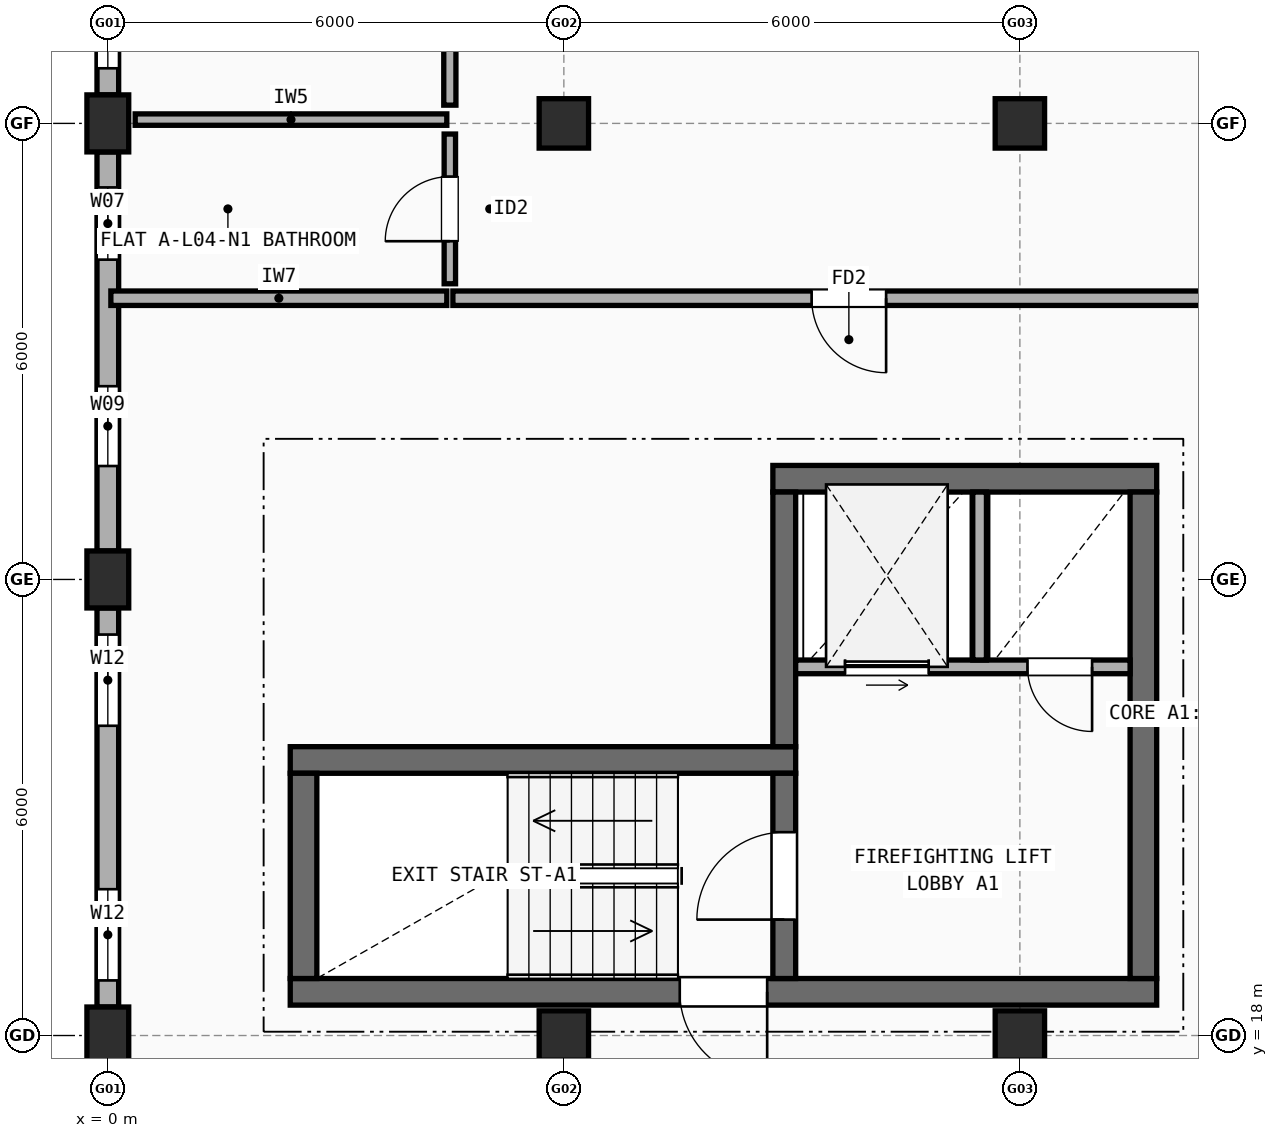
"""IFC4 building model, lengths in metres.
Left out: names, types, materials, properties, quantities, classifications, styles, units other than length and angle.
Written with IfcOpenShell. Run it as: python <this file> out.ifc"""

import sys

from ifc_helpers import new_model, si_unit, direction, frame, frame_2d, origin, origin_2d, place, context, subcontext, project, spatial, rectangle, extrude, element, fill, save


model = new_model("IFC4")
c1 = context("Model", 3, precision=1e-05, world=origin(), true_north=direction((0.0, 1.0)))
c2 = subcontext(c1, "Body", "Model", "MODEL_VIEW")
j1 = project(units=[si_unit("LENGTHUNIT", "METRE"), si_unit("PLANEANGLEUNIT", "RADIAN")], contexts=[c1])
p1 = place(None, origin())
s1 = spatial("IfcSite", under=j1, at=p1, CompositionType="ELEMENT")
p2 = place(p1, origin())
s2 = spatial("IfcBuilding", under=s1, at=p2, CompositionType="ELEMENT")
p3 = place(p2, frame((0.0, 0.0, 14.1)))
s3 = spatial("IfcBuildingStorey", under=s2, at=p3, CompositionType="ELEMENT", Elevation=14.1)
for number, where, z_axis, x_axis in (
    (1, (0.0, 18.0, 0.0), (0.0, 0.0, 1.0), (1.0, 0.0, 0.0)),
    (2, (0.0, 24.0, 0.0), (0.0, 0.0, 1.0), (1.0, 0.0, 0.0)),
    (3, (0.0, 30.0, 0.0), (0.0, 0.0, 1.0), (1.0, 0.0, 0.0)),
):
    element("IfcColumn", number, at=place(p3, frame(where, z_axis=z_axis, x_axis=x_axis)), inside=s3, PredefinedType="COLUMN", context=c2, shape_type="SweptSolid", body=[
        extrude(rectangle(XDim=0.55, YDim=0.75, at=origin_2d()), origin(), (0.0, 0.0, 1.0), 2.95),
    ])
for number, where, z_axis, x_axis in (
    (4, (6.0, 18.0, 0.0), (0.0, 0.0, 1.0), (1.0, 0.0, 0.0)),
    (5, (6.0, 30.0, 0.0), (0.0, 0.0, 1.0), (1.0, 0.0, 0.0)),
    (6, (12.0, 18.0, 0.0), (0.0, 0.0, 1.0), (1.0, 0.0, 0.0)),
    (7, (12.0, 30.0, 0.0), (0.0, 0.0, 1.0), (1.0, 0.0, 0.0)),
):
    element("IfcColumn", number, at=place(p3, frame(where, z_axis=z_axis, x_axis=x_axis)), inside=s3, PredefinedType="COLUMN", context=c2, shape_type="SweptSolid", body=[
        extrude(rectangle(XDim=0.65, YDim=0.65, at=origin_2d()), origin(), (0.0, 0.0, 1.0), 2.95),
    ])
p4 = place(p3, frame((0.0, 35.625, 0.0), z_axis=(0.0, 0.0, 1.0), x_axis=(0.0, -1.0, 0.0)))
e8 = element("IfcWall", 8, at=p4, inside=s3, PredefinedType="STANDARD", context=c2, shape_type="SweptSolid", body=[
    extrude(rectangle(XDim=5.25, YDim=0.285, at=frame_2d((2.625, 0.0))), origin(), (0.0, 0.0, 1.0), 2.432),
])
p5 = place(p4, frame((0.35, 0.0, 0.9)))
e9 = element("IfcOpeningElement", 9, at=p5, cuts=e8, PredefinedType="OPENING", context=c2, shape_type="SweptSolid", body=[
    extrude(rectangle(XDim=0.85, YDim=1.25, at=frame_2d((0.425, 0.625))), frame((0.0, 0.152, 0.0), z_axis=(0.0, -1.0, 0.0), x_axis=(1.0, 0.0, 0.0)), (0.0, 0.0, 1.0), 0.305),
])
p6 = place(p4, frame((4.05, 0.0, 0.9)))
e10 = element("IfcOpeningElement", 10, at=p6, cuts=e8, PredefinedType="OPENING", context=c2, shape_type="SweptSolid", body=[
    extrude(rectangle(XDim=0.85, YDim=1.25, at=frame_2d((0.425, 0.625))), frame((0.0, 0.152, 0.0), z_axis=(0.0, -1.0, 0.0), x_axis=(1.0, 0.0, 0.0)), (0.0, 0.0, 1.0), 0.305),
])
p7 = place(p3, frame((0.0, 29.625, 0.0), z_axis=(0.0, 0.0, 1.0), x_axis=(0.0, -1.0, 0.0)))
e11 = element("IfcWall", 11, at=p7, inside=s3, PredefinedType="STANDARD", context=c2, shape_type="SweptSolid", body=[
    extrude(rectangle(XDim=5.25, YDim=0.285, at=frame_2d((2.625, 0.0))), origin(), (0.0, 0.0, 1.0), 2.432),
])
p8 = place(p7, frame((0.468, 0.0, 0.9)))
e12 = element("IfcOpeningElement", 12, at=p8, cuts=e11, PredefinedType="OPENING", context=c2, shape_type="SweptSolid", body=[
    extrude(rectangle(XDim=0.95, YDim=1.35, at=frame_2d((0.475, 0.675))), frame((0.0, 0.152, 0.0), z_axis=(0.0, -1.0, 0.0), x_axis=(1.0, 0.0, 0.0)), (0.0, 0.0, 1.0), 0.305),
])
p9 = place(p7, frame((3.083, 0.0, 0.9)))
e13 = element("IfcOpeningElement", 13, at=p9, cuts=e11, PredefinedType="OPENING", context=c2, shape_type="SweptSolid", body=[
    extrude(rectangle(XDim=1.05, YDim=1.35, at=frame_2d((0.525, 0.675))), frame((0.0, 0.152, 0.0), z_axis=(0.0, -1.0, 0.0), x_axis=(1.0, 0.0, 0.0)), (0.0, 0.0, 1.0), 0.305),
])
p10 = place(p3, frame((0.0, 23.625, 0.0), z_axis=(0.0, 0.0, 1.0), x_axis=(0.0, -1.0, 0.0)))
e14 = element("IfcWall", 14, at=p10, inside=s3, PredefinedType="STANDARD", context=c2, shape_type="SweptSolid", body=[
    extrude(rectangle(XDim=5.25, YDim=0.285, at=frame_2d((2.625, 0.0))), origin(), (0.0, 0.0, 1.0), 2.432),
])
p11 = place(p10, frame((0.35, 0.0, 0.9)))
e15 = element("IfcOpeningElement", 15, at=p11, cuts=e14, PredefinedType="OPENING", context=c2, shape_type="SweptSolid", body=[
    extrude(rectangle(XDim=1.2, YDim=1.35, at=frame_2d((0.6, 0.675))), frame((0.0, 0.152, 0.0), z_axis=(0.0, -1.0, 0.0), x_axis=(1.0, 0.0, 0.0)), (0.0, 0.0, 1.0), 0.305),
])
p12 = place(p10, frame((3.7, 0.0, 0.9)))
e16 = element("IfcOpeningElement", 16, at=p12, cuts=e14, PredefinedType="OPENING", context=c2, shape_type="SweptSolid", body=[
    extrude(rectangle(XDim=1.2, YDim=1.35, at=frame_2d((0.6, 0.675))), frame((0.0, 0.152, 0.0), z_axis=(0.0, -1.0, 0.0), x_axis=(1.0, 0.0, 0.0)), (0.0, 0.0, 1.0), 0.305),
])
p13 = place(p3, frame((2.4, 18.575, 0.0), z_axis=(0.0, 0.0, 1.0), x_axis=(1.0, 0.0, 0.0)))
e17 = element("IfcWall", 17, at=p13, inside=s3, PredefinedType="SHEAR", context=c2, shape_type="SweptSolid", body=[
    extrude(rectangle(XDim=11.4, YDim=0.35, at=frame_2d((5.7, 0.0))), origin(), (0.0, 0.0, 1.0), 2.95),
])
p14 = place(p13, frame((5.125, 0.0, 0.0)))
e18 = element("IfcOpeningElement", 18, at=p14, cuts=e17, PredefinedType="OPENING", context=c2, shape_type="SweptSolid", body=[
    extrude(rectangle(XDim=1.15, YDim=2.15, at=frame_2d((0.575, 1.075))), frame((0.0, 0.185, 0.0), z_axis=(0.0, -1.0, 0.0), x_axis=(1.0, 0.0, 0.0)), (0.0, 0.0, 1.0), 0.37),
])
p15 = place(p3, frame((9.05, 21.625, 0.0), z_axis=(0.0, 0.0, 1.0), x_axis=(-1.0, 0.0, 0.0)))
e19 = element("IfcWall", 19, at=p15, inside=s3, PredefinedType="SHEAR", context=c2, shape_type="SweptSolid", body=[
    extrude(rectangle(XDim=6.65, YDim=0.35, at=frame_2d((3.325, 0.0))), origin(), (0.0, 0.0, 1.0), 2.95),
])
p16 = place(p3, frame((2.575, 21.45, 0.0), z_axis=(0.0, 0.0, 1.0), x_axis=(0.0, -1.0, 0.0)))
e20 = element("IfcWall", 20, at=p16, inside=s3, PredefinedType="SHEAR", context=c2, shape_type="SweptSolid", body=[
    extrude(rectangle(XDim=2.7, YDim=0.35, at=frame_2d((1.35, 0.0))), origin(), (0.0, 0.0, 1.0), 2.95),
])
p17 = place(p3, frame((8.9, 18.75, 0.0), z_axis=(0.0, 0.0, 1.0), x_axis=(0.0, 1.0, 0.0)))
e21 = element("IfcWall", 21, at=p17, inside=s3, PredefinedType="SHEAR", context=c2, shape_type="SweptSolid", body=[
    extrude(rectangle(XDim=2.7, YDim=0.3, at=frame_2d((1.35, 0.0))), origin(), (0.0, 0.0, 1.0), 2.95),
])
p18 = place(p17, frame((0.775, 0.0, 0.0)))
e22 = element("IfcOpeningElement", 22, at=p18, cuts=e21, PredefinedType="OPENING", context=c2, shape_type="SweptSolid", body=[
    extrude(rectangle(XDim=1.15, YDim=2.15, at=frame_2d((0.575, 1.075))), frame((0.0, 0.16, 0.0), z_axis=(0.0, -1.0, 0.0), x_axis=(1.0, 0.0, 0.0)), (0.0, 0.0, 1.0), 0.32),
])
p19 = place(p3, frame((13.8, 25.325, 0.0), z_axis=(0.0, 0.0, 1.0), x_axis=(-1.0, 0.0, 0.0)))
e23 = element("IfcWall", 23, at=p19, inside=s3, PredefinedType="SHEAR", context=c2, shape_type="SweptSolid", body=[
    extrude(rectangle(XDim=5.05, YDim=0.35, at=frame_2d((2.525, 0.0))), origin(), (0.0, 0.0, 1.0), 2.95),
])
p20 = place(p3, frame((13.625, 18.75, 0.0), z_axis=(0.0, 0.0, 1.0), x_axis=(0.0, 1.0, 0.0)))
e24 = element("IfcWall", 24, at=p20, inside=s3, PredefinedType="SHEAR", context=c2, shape_type="SweptSolid", body=[
    extrude(rectangle(XDim=6.4, YDim=0.35, at=frame_2d((3.2, 0.0))), origin(), (0.0, 0.0, 1.0), 2.95),
])
p21 = place(p3, frame((8.9, 21.8, 0.0), z_axis=(0.0, 0.0, 1.0), x_axis=(0.0, 1.0, 0.0)))
e25 = element("IfcWall", 25, at=p21, inside=s3, PredefinedType="SHEAR", context=c2, shape_type="SweptSolid", body=[
    extrude(rectangle(XDim=3.35, YDim=0.3, at=frame_2d((1.675, 0.0))), origin(), (0.0, 0.0, 1.0), 2.95),
])
p22 = place(p3, frame((9.05, 22.85, 0.0), z_axis=(0.0, 0.0, 1.0), x_axis=(1.0, 0.0, 0.0)))
e26 = element("IfcWall", 26, at=p22, inside=s3, PredefinedType="SOLIDWALL", context=c2, shape_type="SweptSolid", body=[
    extrude(rectangle(XDim=4.4, YDim=0.18, at=frame_2d((2.2, 0.0))), origin(), (0.0, 0.0, 1.0), 2.95),
])
p23 = place(p22, frame((0.65, 0.0, 0.0)))
e27 = element("IfcOpeningElement", 27, at=p23, cuts=e26, PredefinedType="OPENING", context=c2, shape_type="SweptSolid", body=[
    extrude(rectangle(XDim=1.1, YDim=2.15, at=frame_2d((0.55, 1.075))), frame((0.0, 0.1, 0.0), z_axis=(0.0, -1.0, 0.0), x_axis=(1.0, 0.0, 0.0)), (0.0, 0.0, 1.0), 0.2),
])
p24 = place(p22, frame((3.05, 0.0, 0.0)))
e28 = element("IfcOpeningElement", 28, at=p24, cuts=e26, PredefinedType="OPENING", context=c2, shape_type="SweptSolid", body=[
    extrude(rectangle(XDim=0.85, YDim=2.1, at=frame_2d((0.425, 1.05))), frame((0.0, 0.1, 0.0), z_axis=(0.0, -1.0, 0.0), x_axis=(1.0, 0.0, 0.0)), (0.0, 0.0, 1.0), 0.2),
])
p25 = place(p3, frame((11.47, 22.94, 0.0), z_axis=(0.0, 0.0, 1.0), x_axis=(0.0, 1.0, 0.0)))
e29 = element("IfcWall", 29, at=p25, inside=s3, PredefinedType="SOLIDWALL", context=c2, shape_type="SweptSolid", body=[
    extrude(rectangle(XDim=2.21, YDim=0.18, at=frame_2d((1.105, 0.0))), origin(), (0.0, 0.0, 1.0), 2.95),
])
p26 = place(p3, frame((0.04, 27.7, 0.0), z_axis=(0.0, 0.0, 1.0), x_axis=(1.0, 0.0, 0.0)))
e30 = element("IfcWall", 30, at=p26, inside=s3, PredefinedType="SOLIDWALL", context=c2, shape_type="SweptSolid", body=[
    extrude(rectangle(XDim=4.42, YDim=0.19, at=frame_2d((2.21, 0.0))), origin(), (0.0, 0.0, 1.0), 2.432),
])
p27 = place(p3, frame((4.54, 27.7, 0.0), z_axis=(0.0, 0.0, 1.0), x_axis=(1.0, 0.0, 0.0)))
e31 = element("IfcWall", 31, at=p27, inside=s3, PredefinedType="SOLIDWALL", context=c2, shape_type="SweptSolid", body=[
    extrude(rectangle(XDim=10.42, YDim=0.19, at=frame_2d((5.21, 0.0))), origin(), (0.0, 0.0, 1.0), 2.508),
])
p28 = place(p27, frame((4.72, 0.0, 0.0)))
e32 = element("IfcOpeningElement", 32, at=p28, cuts=e31, PredefinedType="OPENING", context=c2, shape_type="SweptSolid", body=[
    extrude(rectangle(XDim=0.98, YDim=2.15, at=frame_2d((0.49, 1.075))), frame((0.0, 0.105, 0.0), z_axis=(0.0, -1.0, 0.0), x_axis=(1.0, 0.0, 0.0)), (0.0, 0.0, 1.0), 0.21),
])
p29 = place(p3, frame((4.5, 30.24, 0.0), z_axis=(0.0, 0.0, 1.0), x_axis=(0.0, 1.0, 0.0)))
e33 = element("IfcWall", 33, at=p29, inside=s3, PredefinedType="PLUMBINGWALL", context=c2, shape_type="SweptSolid", body=[
    extrude(rectangle(XDim=7.37, YDim=0.16, at=frame_2d((3.685, 0.0))), origin(), (0.0, 0.0, 1.0), 2.432),
])
p30 = place(p29, frame((3.235, 0.0, 0.0)))
e34 = element("IfcOpeningElement", 34, at=p30, cuts=e33, PredefinedType="OPENING", context=c2, shape_type="SweptSolid", body=[
    extrude(rectangle(XDim=0.9, YDim=2.1, at=frame_2d((0.45, 1.05))), frame((0.0, 0.09, 0.0), z_axis=(0.0, -1.0, 0.0), x_axis=(1.0, 0.0, 0.0)), (0.0, 0.0, 1.0), 0.18),
])
p31 = place(p3, frame((4.5, 27.89, 0.0), z_axis=(0.0, 0.0, 1.0), x_axis=(0.0, 1.0, 0.0)))
e35 = element("IfcWall", 35, at=p31, inside=s3, PredefinedType="PARTITIONING", context=c2, shape_type="SweptSolid", body=[
    extrude(rectangle(XDim=1.97, YDim=0.15, at=frame_2d((0.985, 0.0))), origin(), (0.0, 0.0, 1.0), 2.95),
])
p32 = place(p31, frame((0.56, 0.0, 0.0)))
e36 = element("IfcOpeningElement", 36, at=p32, cuts=e35, PredefinedType="OPENING", context=c2, shape_type="SweptSolid", body=[
    extrude(rectangle(XDim=0.85, YDim=2.1, at=frame_2d((0.425, 1.05))), frame((0.0, 0.085, 0.0), z_axis=(0.0, -1.0, 0.0), x_axis=(1.0, 0.0, 0.0)), (0.0, 0.0, 1.0), 0.17),
])
p33 = place(p3, frame((0.36, 30.05, 0.0), z_axis=(0.0, 0.0, 1.0), x_axis=(1.0, 0.0, 0.0)))
e37 = element("IfcWall", 37, at=p33, inside=s3, PredefinedType="PARTITIONING", context=c2, shape_type="SweptSolid", body=[
    extrude(rectangle(XDim=4.1, YDim=0.15, at=frame_2d((2.05, 0.0))), origin(), (0.0, 0.0, 1.0), 2.432),
])
p34 = place(p6, origin())
e38 = element("IfcWindow", 38, at=p34, inside=s3, PartitioningType="SINGLE_PANEL", PredefinedType="WINDOW", context=c2, shape_type="SweptSolid", body=[
    extrude(rectangle(XDim=0.85, YDim=1.25, at=frame_2d((0.425, 0.625))), frame((0.0, 0.03, 0.0), z_axis=(0.0, -1.0, 0.0), x_axis=(1.0, 0.0, 0.0)), (0.0, 0.0, 1.0), 0.06),
])
fill(e10, e38)
p35 = place(p8, origin())
e39 = element("IfcWindow", 39, at=p35, inside=s3, PartitioningType="SINGLE_PANEL", PredefinedType="WINDOW", context=c2, shape_type="SweptSolid", body=[
    extrude(rectangle(XDim=0.95, YDim=1.35, at=frame_2d((0.475, 0.675))), frame((0.0, 0.03, 0.0), z_axis=(0.0, -1.0, 0.0), x_axis=(1.0, 0.0, 0.0)), (0.0, 0.0, 1.0), 0.06),
])
fill(e12, e39)
p36 = place(p9, origin())
e40 = element("IfcWindow", 40, at=p36, inside=s3, PartitioningType="SINGLE_PANEL", PredefinedType="WINDOW", context=c2, shape_type="SweptSolid", body=[
    extrude(rectangle(XDim=1.05, YDim=1.35, at=frame_2d((0.525, 0.675))), frame((0.0, 0.03, 0.0), z_axis=(0.0, -1.0, 0.0), x_axis=(1.0, 0.0, 0.0)), (0.0, 0.0, 1.0), 0.06),
])
fill(e13, e40)
p37 = place(p11, origin())
e41 = element("IfcWindow", 41, at=p37, inside=s3, PartitioningType="SINGLE_PANEL", PredefinedType="WINDOW", context=c2, shape_type="SweptSolid", body=[
    extrude(rectangle(XDim=1.2, YDim=1.35, at=frame_2d((0.6, 0.675))), frame((0.0, 0.03, 0.0), z_axis=(0.0, -1.0, 0.0), x_axis=(1.0, 0.0, 0.0)), (0.0, 0.0, 1.0), 0.06),
])
fill(e15, e41)
p38 = place(p12, origin())
e42 = element("IfcWindow", 42, at=p38, inside=s3, PartitioningType="SINGLE_PANEL", PredefinedType="WINDOW", context=c2, shape_type="SweptSolid", body=[
    extrude(rectangle(XDim=1.2, YDim=1.35, at=frame_2d((0.6, 0.675))), frame((0.0, 0.03, 0.0), z_axis=(0.0, -1.0, 0.0), x_axis=(1.0, 0.0, 0.0)), (0.0, 0.0, 1.0), 0.06),
])
fill(e16, e42)
p39 = place(p14, origin())
e43 = element("IfcDoor", 43, at=p39, inside=s3, OperationType="SINGLE_SWING_RIGHT", PredefinedType="DOOR", context=c2, shape_type="SweptSolid", body=[
    extrude(rectangle(XDim=1.15, YDim=2.15, at=frame_2d((0.575, 1.075))), frame((0.0, 0.025, 0.0), z_axis=(0.0, -1.0, 0.0), x_axis=(1.0, 0.0, 0.0)), (0.0, 0.0, 1.0), 0.05),
])
fill(e18, e43)
p40 = place(p18, origin())
e44 = element("IfcDoor", 44, at=p40, inside=s3, OperationType="SINGLE_SWING_LEFT", PredefinedType="DOOR", context=c2, shape_type="SweptSolid", body=[
    extrude(rectangle(XDim=1.15, YDim=2.15, at=frame_2d((0.575, 1.075))), frame((0.0, 0.025, 0.0), z_axis=(0.0, -1.0, 0.0), x_axis=(1.0, 0.0, 0.0)), (0.0, 0.0, 1.0), 0.05),
])
fill(e22, e44)
p41 = place(p23, origin())
e45 = element("IfcDoor", 45, at=p41, inside=s3, OperationType="SLIDING_TO_LEFT", PredefinedType="DOOR", context=c2, shape_type="SweptSolid", body=[
    extrude(rectangle(XDim=1.1, YDim=2.15, at=frame_2d((0.55, 1.075))), frame((0.0, 0.025, 0.0), z_axis=(0.0, -1.0, 0.0), x_axis=(1.0, 0.0, 0.0)), (0.0, 0.0, 1.0), 0.05),
])
fill(e27, e45)
p42 = place(p24, frame((0.85, 0.0, 0.0), z_axis=(0.0, 0.0, 1.0), x_axis=(-1.0, 0.0, 0.0)))
e46 = element("IfcDoor", 46, at=p42, inside=s3, OperationType="SINGLE_SWING_RIGHT", PredefinedType="DOOR", context=c2, shape_type="SweptSolid", body=[
    extrude(rectangle(XDim=0.85, YDim=2.1, at=frame_2d((0.425, 1.05))), frame((0.0, 0.025, 0.0), z_axis=(0.0, -1.0, 0.0), x_axis=(1.0, 0.0, 0.0)), (0.0, 0.0, 1.0), 0.05),
])
fill(e28, e46)
p43 = place(p28, origin())
e47 = element("IfcDoor", 47, at=p43, inside=s3, OperationType="SINGLE_SWING_RIGHT", PredefinedType="DOOR", context=c2, shape_type="SweptSolid", body=[
    extrude(rectangle(XDim=0.98, YDim=2.15, at=frame_2d((0.49, 1.075))), frame((0.0, 0.025, 0.0), z_axis=(0.0, -1.0, 0.0), x_axis=(1.0, 0.0, 0.0)), (0.0, 0.0, 1.0), 0.05),
])
fill(e32, e47)
p44 = place(p32, origin())
e48 = element("IfcDoor", 48, at=p44, inside=s3, OperationType="SINGLE_SWING_LEFT", PredefinedType="DOOR", context=c2, shape_type="SweptSolid", body=[
    extrude(rectangle(XDim=0.85, YDim=2.1, at=frame_2d((0.425, 1.05))), frame((0.0, 0.025, 0.0), z_axis=(0.0, -1.0, 0.0), x_axis=(1.0, 0.0, 0.0)), (0.0, 0.0, 1.0), 0.05),
])
fill(e36, e48)
save(model, sys.argv[1])
